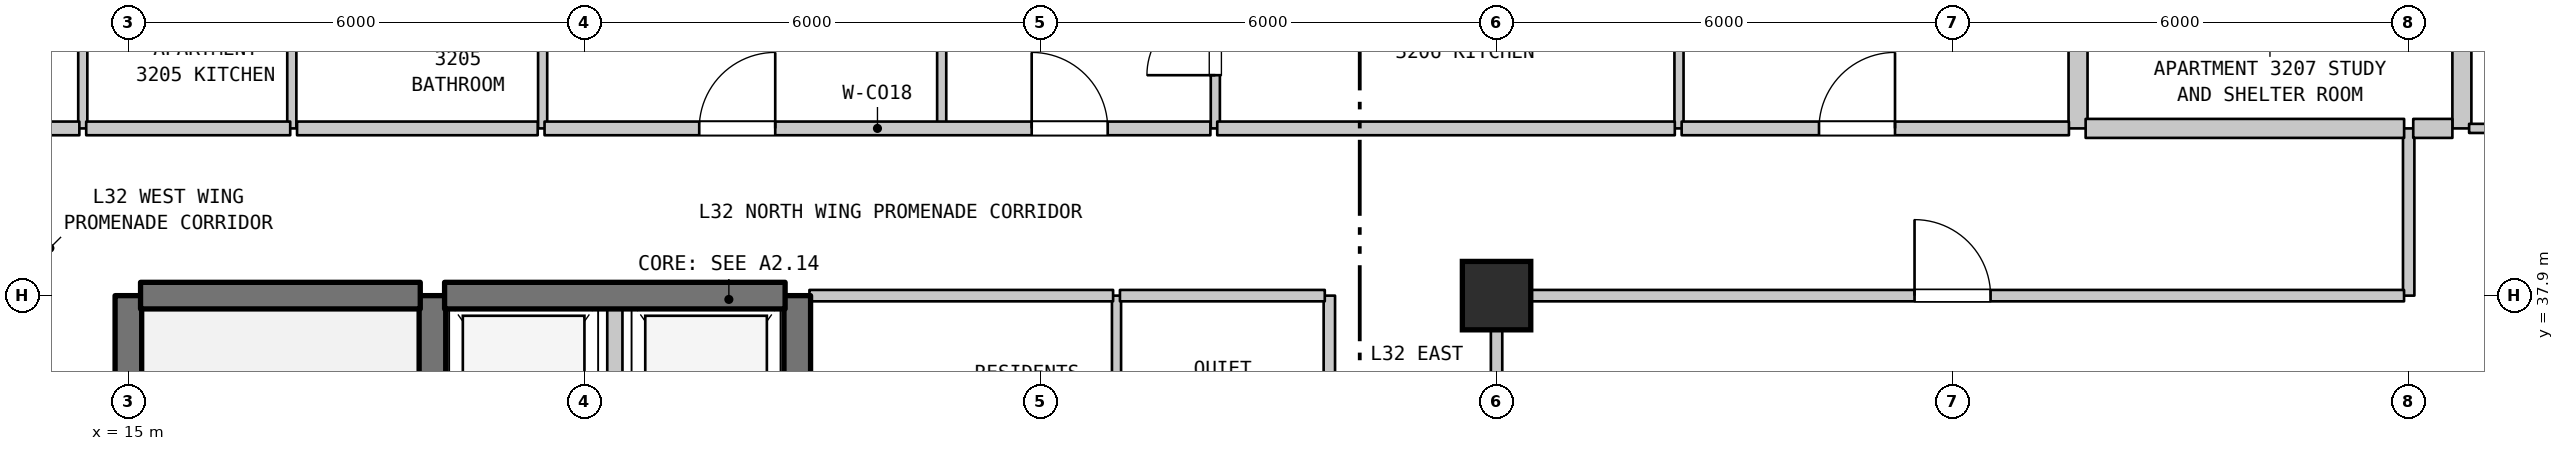
"""IFC4 building model, lengths in metres.
Left out: names, types, materials, properties, quantities, classifications, styles, units other than length and angle.
Written with IfcOpenShell. Run it as: python <this file> out.ifc"""

import sys

from ifc_helpers import new_model, si_unit, direction, frame, frame_2d, origin, origin_2d, place, context, subcontext, project, spatial, rectangle, extrude, element, fill, save


model = new_model("IFC4")
c1 = context("Model", 3, precision=1e-05, world=origin(), true_north=direction((0.0, 1.0)))
c2 = subcontext(c1, "Body", "Model", "MODEL_VIEW")
j1 = project(units=[si_unit("LENGTHUNIT", "METRE"), si_unit("PLANEANGLEUNIT", "RADIAN")], contexts=[c1])
p1 = place(None, origin())
s1 = spatial("IfcSite", under=j1, at=p1, CompositionType="ELEMENT")
p2 = place(p1, origin())
s2 = spatial("IfcBuilding", under=s1, at=p2, CompositionType="ELEMENT")
p3 = place(p2, frame((0.0, 0.0, 133.5)))
s3 = spatial("IfcBuildingStorey", under=s2, at=p3, CompositionType="ELEMENT", Elevation=133.5)
p4 = place(p3, frame((33.0, 37.9, 0.0), z_axis=(0.0, 0.0, 1.0), x_axis=(1.0, 0.0, 0.0)))
e1 = element("IfcColumn", 1, at=p4, inside=s3, PredefinedType="COLUMN", context=c2, shape_type="SweptSolid", body=[
    extrude(rectangle(XDim=0.9, YDim=0.9, at=origin_2d()), origin(), (0.0, 0.0, 1.0), 3.7),
])
p5 = place(p3, frame((14.4, 40.1, 0.0), z_axis=(0.0, 0.0, 1.0), x_axis=(0.0, 1.0, 0.0)))
e2 = element("IfcWall", 2, at=p5, inside=s3, PredefinedType="PARTITIONING", context=c2, shape_type="SweptSolid", body=[
    extrude(rectangle(XDim=2.3, YDim=0.12, at=frame_2d((1.15, 0.0))), origin(), (0.0, 0.0, 1.0), 3.385),
])
p6 = place(p3, frame((15.0, 31.1, 0.0), z_axis=(0.0, 0.0, 1.0), x_axis=(0.0, 1.0, 0.0)))
e3 = element("IfcWall", 3, at=p6, inside=s3, PredefinedType="SHEAR", context=c2, shape_type="SweptSolid", body=[
    extrude(rectangle(XDim=6.8, YDim=0.35, at=frame_2d((3.4, 0.0))), origin(), (0.0, 0.0, 1.0), 3.385),
])
p7 = place(p3, frame((17.15, 40.1, 0.0), z_axis=(0.0, 0.0, 1.0), x_axis=(0.0, 1.0, 0.0)))
e4 = element("IfcWall", 4, at=p7, inside=s3, PredefinedType="PARTITIONING", context=c2, shape_type="SweptSolid", body=[
    extrude(rectangle(XDim=2.3, YDim=0.12, at=frame_2d((1.15, 0.0))), origin(), (0.0, 0.0, 1.0), 3.385),
])
p8 = place(p3, frame((19.0, 35.0, 0.0), z_axis=(0.0, 0.0, 1.0), x_axis=(0.0, 1.0, 0.0)))
e5 = element("IfcWall", 5, at=p8, inside=s3, PredefinedType="SHEAR", context=c2, shape_type="SweptSolid", body=[
    extrude(rectangle(XDim=2.9, YDim=0.35, at=frame_2d((1.45, 0.0))), origin(), (0.0, 0.0, 1.0), 3.385),
])
p9 = place(p3, frame((20.45, 40.1, 0.0), z_axis=(0.0, 0.0, 1.0), x_axis=(0.0, 1.0, 0.0)))
e6 = element("IfcWall", 6, at=p9, inside=s3, PredefinedType="PARTITIONING", context=c2, shape_type="SweptSolid", body=[
    extrude(rectangle(XDim=2.3, YDim=0.12, at=frame_2d((1.15, 0.0))), origin(), (0.0, 0.0, 1.0), 3.385),
])
p10 = place(p3, frame((21.4, 35.0, 0.0), z_axis=(0.0, 0.0, 1.0), x_axis=(0.0, 1.0, 0.0)))
e7 = element("IfcWall", 7, at=p10, inside=s3, PredefinedType="STANDARD", context=c2, shape_type="SweptSolid", body=[
    extrude(rectangle(XDim=2.9, YDim=0.2, at=frame_2d((1.45, 0.0))), origin(), (0.0, 0.0, 1.0), 3.385),
])
p11 = place(p3, frame((23.8, 35.0, 0.0), z_axis=(0.0, 0.0, 1.0), x_axis=(0.0, 1.0, 0.0)))
e8 = element("IfcWall", 8, at=p11, inside=s3, PredefinedType="SHEAR", context=c2, shape_type="SweptSolid", body=[
    extrude(rectangle(XDim=2.9, YDim=0.35, at=frame_2d((1.45, 0.0))), origin(), (0.0, 0.0, 1.0), 3.385),
])
p12 = place(p3, frame((25.7, 40.1, 0.0), z_axis=(0.0, 0.0, 1.0), x_axis=(0.0, 1.0, 0.0)))
e9 = element("IfcWall", 9, at=p12, inside=s3, PredefinedType="PARTITIONING", context=c2, shape_type="SweptSolid", body=[
    extrude(rectangle(XDim=2.05, YDim=0.12, at=frame_2d((1.025, 0.0))), origin(), (0.0, 0.0, 1.0), 3.385),
])
p13 = place(p3, frame((28.0, 35.0, 0.0), z_axis=(0.0, 0.0, 1.0), x_axis=(0.0, 1.0, 0.0)))
e10 = element("IfcWall", 10, at=p13, inside=s3, PredefinedType="PARTITIONING", context=c2, shape_type="SweptSolid", body=[
    extrude(rectangle(XDim=2.9, YDim=0.12, at=frame_2d((1.45, 0.0))), origin(), (0.0, 0.0, 1.0), 3.385),
])
p14 = place(p3, frame((29.3, 40.1, 0.0), z_axis=(0.0, 0.0, 1.0), x_axis=(0.0, 1.0, 0.0)))
e11 = element("IfcWall", 11, at=p14, inside=s3, PredefinedType="PARTITIONING", context=c2, shape_type="SweptSolid", body=[
    extrude(rectangle(XDim=2.3, YDim=0.12, at=frame_2d((1.15, 0.0))), origin(), (0.0, 0.0, 1.0), 3.385),
])
p15 = place(p14, frame((0.7, 0.0, 0.0)))
e12 = element("IfcOpeningElement", 12, at=p15, cuts=e11, PredefinedType="OPENING", context=c2, shape_type="SweptSolid", body=[
    extrude(rectangle(XDim=0.9, YDim=2.15, at=frame_2d((0.45, 1.075))), frame((0.0, 0.07, 0.0), z_axis=(0.0, -1.0, 0.0), x_axis=(1.0, 0.0, 0.0)), (0.0, 0.0, 1.0), 0.14),
])
p16 = place(p3, frame((30.8, 35.0, 0.0), z_axis=(0.0, 0.0, 1.0), x_axis=(0.0, 1.0, 0.0)))
e13 = element("IfcWall", 13, at=p16, inside=s3, PredefinedType="STANDARD", context=c2, shape_type="SweptSolid", body=[
    extrude(rectangle(XDim=2.9, YDim=0.15, at=frame_2d((1.45, 0.0))), origin(), (0.0, 0.0, 1.0), 3.385),
])
p17 = place(p3, frame((33.0, 32.54, 0.0), z_axis=(0.0, 0.0, 1.0), x_axis=(0.0, 1.0, 0.0)))
e14 = element("IfcWall", 14, at=p17, inside=s3, PredefinedType="STANDARD", context=c2, shape_type="SweptSolid", body=[
    extrude(rectangle(XDim=5.36, YDim=0.15, at=frame_2d((2.68, 0.0))), origin(), (0.0, 0.0, 1.0), 2.885),
])
p18 = place(p17, frame((2.109, 0.0, 0.0)))
e15 = element("IfcOpeningElement", 15, at=p18, cuts=e14, PredefinedType="OPENING", context=c2, shape_type="SweptSolid", body=[
    extrude(rectangle(XDim=1.0, YDim=2.15, at=frame_2d((0.5, 1.075))), frame((0.0, 0.085, 0.0), z_axis=(0.0, -1.0, 0.0), x_axis=(1.0, 0.0, 0.0)), (0.0, 0.0, 1.0), 0.17),
])
p19 = place(p3, frame((35.4, 40.1, 0.0), z_axis=(0.0, 0.0, 1.0), x_axis=(0.0, 1.0, 0.0)))
e16 = element("IfcWall", 16, at=p19, inside=s3, PredefinedType="PARTITIONING", context=c2, shape_type="SweptSolid", body=[
    extrude(rectangle(XDim=2.05, YDim=0.12, at=frame_2d((1.025, 0.0))), origin(), (0.0, 0.0, 1.0), 3.385),
])
p20 = place(p3, frame((40.65, 40.1, 0.0), z_axis=(0.0, 0.0, 1.0), x_axis=(0.0, 1.0, 0.0)))
e17 = element("IfcWall", 17, at=p20, inside=s3, PredefinedType="STANDARD", context=c2, shape_type="SweptSolid", body=[
    extrude(rectangle(XDim=2.3, YDim=0.25, at=frame_2d((1.15, 0.0))), origin(), (0.0, 0.0, 1.0), 3.385),
])
p21 = place(p3, frame((45.0, 37.9, 0.0), z_axis=(0.0, 0.0, 1.0), x_axis=(0.0, 1.0, 0.0)))
e18 = element("IfcWall", 18, at=p21, inside=s3, PredefinedType="STANDARD", context=c2, shape_type="SweptSolid", body=[
    extrude(rectangle(XDim=2.2, YDim=0.15, at=frame_2d((1.1, 0.0))), origin(), (0.0, 0.0, 1.0), 3.385),
])
p22 = place(p3, frame((45.7, 40.1, 0.0), z_axis=(0.0, 0.0, 1.0), x_axis=(0.0, 1.0, 0.0)))
e19 = element("IfcWall", 19, at=p22, inside=s3, PredefinedType="STANDARD", context=c2, shape_type="SweptSolid", body=[
    extrude(rectangle(XDim=2.3, YDim=0.25, at=frame_2d((1.15, 0.0))), origin(), (0.0, 0.0, 1.0), 3.385),
])
p23 = place(p3, frame((15.16, 37.9, 0.0), z_axis=(0.0, 0.0, 1.0), x_axis=(1.0, 0.0, 0.0)))
e20 = element("IfcWall", 20, at=p23, inside=s3, PredefinedType="SHEAR", context=c2, shape_type="SweptSolid", body=[
    extrude(rectangle(XDim=3.68, YDim=0.35, at=frame_2d((1.84, 0.0))), origin(), (0.0, 0.0, 1.0), 3.385),
])
p24 = place(p3, frame((19.16, 37.9, 0.0), z_axis=(0.0, 0.0, 1.0), x_axis=(1.0, 0.0, 0.0)))
e21 = element("IfcWall", 21, at=p24, inside=s3, PredefinedType="SHEAR", context=c2, shape_type="SweptSolid", body=[
    extrude(rectangle(XDim=4.48, YDim=0.35, at=frame_2d((2.24, 0.0))), origin(), (0.0, 0.0, 1.0), 3.385),
])
p25 = place(p3, frame((23.96, 37.9, 0.0), z_axis=(0.0, 0.0, 1.0), x_axis=(1.0, 0.0, 0.0)))
e22 = element("IfcWall", 22, at=p25, inside=s3, PredefinedType="STANDARD", context=c2, shape_type="SweptSolid", body=[
    extrude(rectangle(XDim=3.995, YDim=0.15, at=frame_2d((1.998, 0.0))), origin(), (0.0, 0.0, 1.0), 2.885),
])
p26 = place(p3, frame((28.045, 37.9, 0.0), z_axis=(0.0, 0.0, 1.0), x_axis=(1.0, 0.0, 0.0)))
e23 = element("IfcWall", 23, at=p26, inside=s3, PredefinedType="STANDARD", context=c2, shape_type="SweptSolid", body=[
    extrude(rectangle(XDim=2.695, YDim=0.15, at=frame_2d((1.348, 0.0))), origin(), (0.0, 0.0, 1.0), 2.885),
])
p27 = place(p3, frame((33.06, 37.9, 0.0), z_axis=(0.0, 0.0, 1.0), x_axis=(1.0, 0.0, 0.0)))
e24 = element("IfcWall", 24, at=p27, inside=s3, PredefinedType="STANDARD", context=c2, shape_type="SweptSolid", body=[
    extrude(rectangle(XDim=11.879, YDim=0.15, at=frame_2d((5.939, 0.0))), origin(), (0.0, 0.0, 1.0), 3.385),
])
p28 = place(p27, frame((5.439, 0.0, 0.0)))
e25 = element("IfcOpeningElement", 25, at=p28, cuts=e24, PredefinedType="OPENING", context=c2, shape_type="SweptSolid", body=[
    extrude(rectangle(XDim=1.0, YDim=2.15, at=frame_2d((0.5, 1.075))), frame((0.0, 0.085, 0.0), z_axis=(0.0, -1.0, 0.0), x_axis=(1.0, 0.0, 0.0)), (0.0, 0.0, 1.0), 0.17),
])
p29 = place(p3, frame((12.875, 40.1, 0.0), z_axis=(0.0, 0.0, 1.0), x_axis=(1.0, 0.0, 0.0)))
e26 = element("IfcWall", 26, at=p29, inside=s3, PredefinedType="STANDARD", context=c2, shape_type="SweptSolid", body=[
    extrude(rectangle(XDim=1.48, YDim=0.18, at=frame_2d((0.74, 0.0))), origin(), (0.0, 0.0, 1.0), 3.385),
])
p30 = place(p3, frame((14.445, 40.1, 0.0), z_axis=(0.0, 0.0, 1.0), x_axis=(1.0, 0.0, 0.0)))
e27 = element("IfcWall", 27, at=p30, inside=s3, PredefinedType="STANDARD", context=c2, shape_type="SweptSolid", body=[
    extrude(rectangle(XDim=2.684, YDim=0.18, at=frame_2d((1.342, 0.0))), origin(), (0.0, 0.0, 1.0), 3.385),
])
p31 = place(p3, frame((17.219, 40.1, 0.0), z_axis=(0.0, 0.0, 1.0), x_axis=(1.0, 0.0, 0.0)))
e28 = element("IfcWall", 28, at=p31, inside=s3, PredefinedType="STANDARD", context=c2, shape_type="SweptSolid", body=[
    extrude(rectangle(XDim=3.166, YDim=0.18, at=frame_2d((1.583, 0.0))), origin(), (0.0, 0.0, 1.0), 3.385),
])
p32 = place(p3, frame((20.475, 40.1, 0.0), z_axis=(0.0, 0.0, 1.0), x_axis=(1.0, 0.0, 0.0)))
e29 = element("IfcWall", 29, at=p32, inside=s3, PredefinedType="STANDARD", context=c2, shape_type="SweptSolid", body=[
    extrude(rectangle(XDim=8.76, YDim=0.18, at=frame_2d((4.38, 0.0))), origin(), (0.0, 0.0, 1.0), 3.385),
])
p33 = place(p32, frame((2.035, 0.0, 0.0)))
e30 = element("IfcOpeningElement", 30, at=p33, cuts=e29, PredefinedType="OPENING", context=c2, shape_type="SweptSolid", body=[
    extrude(rectangle(XDim=1.0, YDim=2.15, at=frame_2d((0.5, 1.075))), frame((0.0, 0.1, 0.0), z_axis=(0.0, -1.0, 0.0), x_axis=(1.0, 0.0, 0.0)), (0.0, 0.0, 1.0), 0.2),
])
p34 = place(p32, frame((6.409, 0.0, 0.0)))
e31 = element("IfcOpeningElement", 31, at=p34, cuts=e29, PredefinedType="OPENING", context=c2, shape_type="SweptSolid", body=[
    extrude(rectangle(XDim=1.0, YDim=2.15, at=frame_2d((0.5, 1.075))), frame((0.0, 0.1, 0.0), z_axis=(0.0, -1.0, 0.0), x_axis=(1.0, 0.0, 0.0)), (0.0, 0.0, 1.0), 0.2),
])
p35 = place(p3, frame((29.325, 40.1, 0.0), z_axis=(0.0, 0.0, 1.0), x_axis=(1.0, 0.0, 0.0)))
e32 = element("IfcWall", 32, at=p35, inside=s3, PredefinedType="STANDARD", context=c2, shape_type="SweptSolid", body=[
    extrude(rectangle(XDim=6.02, YDim=0.18, at=frame_2d((3.01, 0.0))), origin(), (0.0, 0.0, 1.0), 3.385),
])
p36 = place(p3, frame((35.435, 40.1, 0.0), z_axis=(0.0, 0.0, 1.0), x_axis=(1.0, 0.0, 0.0)))
e33 = element("IfcWall", 33, at=p36, inside=s3, PredefinedType="STANDARD", context=c2, shape_type="SweptSolid", body=[
    extrude(rectangle(XDim=5.095, YDim=0.18, at=frame_2d((2.547, 0.0))), origin(), (0.0, 0.0, 1.0), 3.385),
])
p37 = place(p36, frame((1.807, 0.0, 0.0)))
e34 = element("IfcOpeningElement", 34, at=p37, cuts=e33, PredefinedType="OPENING", context=c2, shape_type="SweptSolid", body=[
    extrude(rectangle(XDim=1.0, YDim=2.15, at=frame_2d((0.5, 1.075))), frame((0.0, 0.1, 0.0), z_axis=(0.0, -1.0, 0.0), x_axis=(1.0, 0.0, 0.0)), (0.0, 0.0, 1.0), 0.2),
])
p38 = place(p3, frame((40.75, 40.1, 0.0), z_axis=(0.0, 0.0, 1.0), x_axis=(1.0, 0.0, 0.0)))
e35 = element("IfcWall", 35, at=p38, inside=s3, PredefinedType="STANDARD", context=c2, shape_type="SweptSolid", body=[
    extrude(rectangle(XDim=4.19, YDim=0.25, at=frame_2d((2.095, 0.0))), origin(), (0.0, 0.0, 1.0), 3.385),
])
p39 = place(p3, frame((45.06, 40.1, 0.0), z_axis=(0.0, 0.0, 1.0), x_axis=(1.0, 0.0, 0.0)))
e36 = element("IfcWall", 36, at=p39, inside=s3, PredefinedType="STANDARD", context=c2, shape_type="SweptSolid", body=[
    extrude(rectangle(XDim=0.515, YDim=0.25, at=frame_2d((0.257, 0.0))), origin(), (0.0, 0.0, 1.0), 3.385),
])
p40 = place(p3, frame((45.795, 40.1, 0.0), z_axis=(0.0, 0.0, 1.0), x_axis=(1.0, 0.0, 0.0)))
e37 = element("IfcWall", 37, at=p40, inside=s3, PredefinedType="PARTITIONING", context=c2, shape_type="SweptSolid", body=[
    extrude(rectangle(XDim=4.145, YDim=0.12, at=frame_2d((2.073, 0.0))), origin(), (0.0, 0.0, 1.0), 3.385),
])
p41 = place(p15, origin())
e38 = element("IfcDoor", 38, at=p41, inside=s3, OperationType="SINGLE_SWING_LEFT", PredefinedType="DOOR", context=c2, shape_type="SweptSolid", body=[
    extrude(rectangle(XDim=0.9, YDim=2.15, at=frame_2d((0.45, 1.075))), frame((0.0, 0.025, 0.0), z_axis=(0.0, -1.0, 0.0), x_axis=(1.0, 0.0, 0.0)), (0.0, 0.0, 1.0), 0.05),
])
fill(e12, e38)
p42 = place(p28, origin())
e39 = element("IfcDoor", 39, at=p42, inside=s3, OperationType="SINGLE_SWING_LEFT", PredefinedType="DOOR", context=c2, shape_type="SweptSolid", body=[
    extrude(rectangle(XDim=1.0, YDim=2.15, at=frame_2d((0.5, 1.075))), frame((0.0, 0.025, 0.0), z_axis=(0.0, -1.0, 0.0), x_axis=(1.0, 0.0, 0.0)), (0.0, 0.0, 1.0), 0.05),
])
fill(e25, e39)
p43 = place(p33, origin())
e40 = element("IfcDoor", 40, at=p43, inside=s3, OperationType="SINGLE_SWING_RIGHT", PredefinedType="DOOR", context=c2, shape_type="SweptSolid", body=[
    extrude(rectangle(XDim=1.0, YDim=2.15, at=frame_2d((0.5, 1.075))), frame((0.0, 0.025, 0.0), z_axis=(0.0, -1.0, 0.0), x_axis=(1.0, 0.0, 0.0)), (0.0, 0.0, 1.0), 0.05),
])
fill(e30, e40)
p44 = place(p34, origin())
e41 = element("IfcDoor", 41, at=p44, inside=s3, OperationType="SINGLE_SWING_LEFT", PredefinedType="DOOR", context=c2, shape_type="SweptSolid", body=[
    extrude(rectangle(XDim=1.0, YDim=2.15, at=frame_2d((0.5, 1.075))), frame((0.0, 0.025, 0.0), z_axis=(0.0, -1.0, 0.0), x_axis=(1.0, 0.0, 0.0)), (0.0, 0.0, 1.0), 0.05),
])
fill(e31, e41)
p45 = place(p37, origin())
e42 = element("IfcDoor", 42, at=p45, inside=s3, OperationType="SINGLE_SWING_RIGHT", PredefinedType="DOOR", context=c2, shape_type="SweptSolid", body=[
    extrude(rectangle(XDim=1.0, YDim=2.15, at=frame_2d((0.5, 1.075))), frame((0.0, 0.025, 0.0), z_axis=(0.0, -1.0, 0.0), x_axis=(1.0, 0.0, 0.0)), (0.0, 0.0, 1.0), 0.05),
])
fill(e34, e42)
save(model, sys.argv[1])
